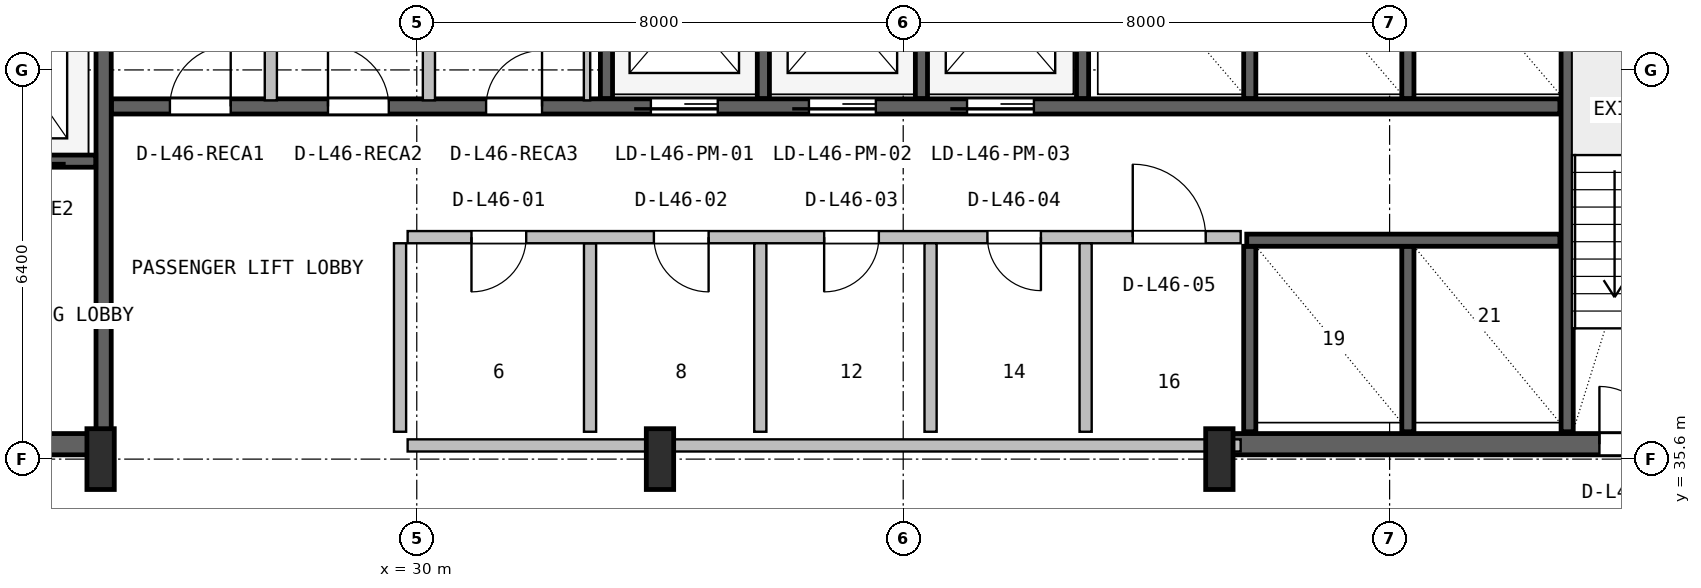
"""IFC4 building model, lengths in metres.
Left out: names, types, materials, properties, quantities, classifications, styles, units other than length and angle.
Written with IfcOpenShell. Run it as: python <this file> out.ifc"""

import sys

from ifc_helpers import new_model, si_unit, direction, frame, frame_2d, origin, origin_2d, place, context, subcontext, project, spatial, rectangle, i_section, extrude, source, transform, mapped, element, fill, save


model = new_model("IFC4")
c1 = context("Model", 3, precision=1e-05, world=origin(), true_north=direction((0.0, 1.0)))
c2 = subcontext(c1, "Body", "Model", "MODEL_VIEW")
j1 = project(units=[si_unit("LENGTHUNIT", "METRE"), si_unit("PLANEANGLEUNIT", "RADIAN")], contexts=[c1])
p1 = place(None, origin())
s1 = spatial("IfcSite", under=j1, at=p1, CompositionType="ELEMENT")
p2 = place(p1, origin())
s2 = spatial("IfcBuilding", under=s1, at=p2, CompositionType="ELEMENT")
p3 = place(p2, frame((0.0, 0.0, 187.6)))
s3 = spatial("IfcBuildingStorey", under=s2, at=p3, CompositionType="ELEMENT", Elevation=187.6)
p4 = place(p3, frame((15.67, 35.845, 0.0), z_axis=(0.0, 0.0, 1.0), x_axis=(1.0, 0.0, 0.0)))
e1 = element("IfcWall", 1, at=p4, inside=s3, PredefinedType="SHEAR", context=c2, shape_type="SweptSolid", body=[
    extrude(rectangle(XDim=9.13, YDim=0.35, at=frame_2d((4.565, 0.0))), origin(), (0.0, 0.0, 1.0), 3.52),
])
p5 = place(p4, frame((5.4, 0.0, 0.0)))
e2 = element("IfcOpeningElement", 2, at=p5, cuts=e1, PredefinedType="OPENING", context=c2, shape_type="SweptSolid", body=[
    extrude(rectangle(XDim=1.0, YDim=2.1, at=frame_2d((0.5, 1.05))), frame((0.0, 0.185, 0.0), z_axis=(0.0, -1.0, 0.0), x_axis=(1.0, 0.0, 0.0)), (0.0, 0.0, 1.0), 0.37),
])
p6 = place(p3, frame((43.2, 35.845, 0.0), z_axis=(0.0, 0.0, 1.0), x_axis=(1.0, 0.0, 0.0)))
e3 = element("IfcWall", 3, at=p6, inside=s3, PredefinedType="SHEAR", context=c2, shape_type="SweptSolid", body=[
    extrude(rectangle(XDim=9.13, YDim=0.35, at=frame_2d((4.565, 0.0))), origin(), (0.0, 0.0, 1.0), 3.52),
])
p7 = place(p6, frame((6.25, 0.0, 0.0)))
e4 = element("IfcOpeningElement", 4, at=p7, cuts=e3, PredefinedType="OPENING", context=c2, shape_type="SweptSolid", body=[
    extrude(rectangle(XDim=0.95, YDim=2.1, at=frame_2d((0.475, 1.05))), frame((0.0, 0.185, 0.0), z_axis=(0.0, -1.0, 0.0), x_axis=(1.0, 0.0, 0.0)), (0.0, 0.0, 1.0), 0.37),
])
m1 = source(origin(), c2, "Body", "SweptSolid", [
    extrude(i_section(OverallWidth=0.45, OverallDepth=1.0, WebThickness=0.016, FlangeThickness=0.03, FilletRadius=0.016, at=origin_2d()), origin(), (0.0, 0.0, 1.0), 3.8),
])
for number, where, z_axis, x_axis in (
    (5, (24.8, 35.6, 0.0), (0.0, 0.0, 1.0), (1.0, 0.0, 0.0)),
    (6, (34.0, 35.6, 0.0), (0.0, 0.0, 1.0), (1.0, 0.0, 0.0)),
    (7, (43.2, 35.6, 0.0), (0.0, 0.0, 1.0), (1.0, 0.0, 0.0)),
):
    element("IfcColumn", number, at=place(p3, frame(where, z_axis=z_axis, x_axis=x_axis)), inside=s3, PredefinedType="COLUMN", context=c2, shape_type="MappedRepresentation", body=[
        mapped(m1, transform((0.0, 0.0, 0.0), x_axis=(1.0, 0.0, 0.0), y_axis=(0.0, 1.0, 0.0), z_axis=(0.0, 0.0, 1.0), scale=1.0)),
    ])
p8 = place(p3, frame((24.85, 36.05, 0.0), z_axis=(0.0, 0.0, 1.0), x_axis=(0.0, 1.0, 0.0)))
e8 = element("IfcWall", 8, at=p8, inside=s3, PredefinedType="SHEAR", context=c2, shape_type="SweptSolid", body=[
    extrude(rectangle(XDim=10.45, YDim=0.25, at=frame_2d((5.225, 0.0))), origin(), (0.0, 0.0, 1.0), 3.52),
])
p9 = place(p3, frame((19.2, 40.5, 0.0), z_axis=(0.0, 0.0, 1.0), x_axis=(1.0, 0.0, 0.0)))
e9 = element("IfcWall", 9, at=p9, inside=s3, PredefinedType="SHEAR", context=c2, shape_type="SweptSolid", body=[
    extrude(rectangle(XDim=5.52, YDim=0.2, at=frame_2d((2.76, 0.0))), origin(), (0.0, 0.0, 1.0), 3.52),
])
p10 = place(p9, frame((1.05, 0.0, 0.0)))
e10 = element("IfcOpeningElement", 10, at=p10, cuts=e9, PredefinedType="OPENING", context=c2, shape_type="SweptSolid", body=[
    extrude(rectangle(XDim=1.1, YDim=2.18, at=frame_2d((0.55, 1.09))), frame((0.0, 0.11, 0.0), z_axis=(0.0, -1.0, 0.0), x_axis=(1.0, 0.0, 0.0)), (0.0, 0.0, 1.0), 0.22),
])
p11 = place(p9, frame((3.65, 0.0, 0.0)))
e11 = element("IfcOpeningElement", 11, at=p11, cuts=e9, PredefinedType="OPENING", context=c2, shape_type="SweptSolid", body=[
    extrude(rectangle(XDim=1.1, YDim=2.18, at=frame_2d((0.55, 1.09))), frame((0.0, 0.11, 0.0), z_axis=(0.0, -1.0, 0.0), x_axis=(1.0, 0.0, 0.0)), (0.0, 0.0, 1.0), 0.22),
])
p12 = place(p3, frame((48.92, 36.05, 0.0), z_axis=(0.0, 0.0, 1.0), x_axis=(0.0, 1.0, 0.0)))
e12 = element("IfcWall", 12, at=p12, inside=s3, PredefinedType="SHEAR", context=c2, shape_type="SweptSolid", body=[
    extrude(rectangle(XDim=10.5, YDim=0.2, at=frame_2d((5.25, 0.0))), origin(), (0.0, 0.0, 1.0), 3.52),
])
p13 = place(p3, frame((24.98, 41.4, 0.0), z_axis=(0.0, 0.0, 1.0), x_axis=(1.0, 0.0, 0.0)))
e13 = element("IfcWall", 13, at=p13, inside=s3, PredefinedType="SHEAR", context=c2, shape_type="SweptSolid", body=[
    extrude(rectangle(XDim=23.82, YDim=0.25, at=frame_2d((11.91, 0.0))), origin(), (0.0, 0.0, 1.0), 3.52),
])
p14 = place(p13, frame((8.87, 0.0, 0.0)))
e14 = element("IfcOpeningElement", 14, at=p14, cuts=e13, PredefinedType="OPENING", context=c2, shape_type="SweptSolid", body=[
    extrude(rectangle(XDim=1.1, YDim=2.18, at=frame_2d((0.55, 1.09))), frame((0.0, 0.135, 0.0), z_axis=(0.0, -1.0, 0.0), x_axis=(1.0, 0.0, 0.0)), (0.0, 0.0, 1.0), 0.27),
])
p15 = place(p13, frame((11.47, 0.0, 0.0)))
e15 = element("IfcOpeningElement", 15, at=p15, cuts=e13, PredefinedType="OPENING", context=c2, shape_type="SweptSolid", body=[
    extrude(rectangle(XDim=1.1, YDim=2.18, at=frame_2d((0.55, 1.09))), frame((0.0, 0.135, 0.0), z_axis=(0.0, -1.0, 0.0), x_axis=(1.0, 0.0, 0.0)), (0.0, 0.0, 1.0), 0.27),
])
p16 = place(p13, frame((14.07, 0.0, 0.0)))
e16 = element("IfcOpeningElement", 16, at=p16, cuts=e13, PredefinedType="OPENING", context=c2, shape_type="SweptSolid", body=[
    extrude(rectangle(XDim=1.1, YDim=2.18, at=frame_2d((0.55, 1.09))), frame((0.0, 0.135, 0.0), z_axis=(0.0, -1.0, 0.0), x_axis=(1.0, 0.0, 0.0)), (0.0, 0.0, 1.0), 0.27),
])
p17 = place(p13, frame((0.96, 0.0, 0.0)))
e17 = element("IfcOpeningElement", 17, at=p17, cuts=e13, PredefinedType="OPENING", context=c2, shape_type="SweptSolid", body=[
    extrude(rectangle(XDim=1.0, YDim=2.08, at=frame_2d((0.5, 1.04))), frame((0.0, 0.135, 0.0), z_axis=(0.0, -1.0, 0.0), x_axis=(1.0, 0.0, 0.0)), (0.0, 0.0, 1.0), 0.27),
])
p18 = place(p13, frame((3.56, 0.0, 0.0)))
e18 = element("IfcOpeningElement", 18, at=p18, cuts=e13, PredefinedType="OPENING", context=c2, shape_type="SweptSolid", body=[
    extrude(rectangle(XDim=1.0, YDim=2.08, at=frame_2d((0.5, 1.04))), frame((0.0, 0.135, 0.0), z_axis=(0.0, -1.0, 0.0), x_axis=(1.0, 0.0, 0.0)), (0.0, 0.0, 1.0), 0.27),
])
p19 = place(p13, frame((6.16, 0.0, 0.0)))
e19 = element("IfcOpeningElement", 19, at=p19, cuts=e13, PredefinedType="OPENING", context=c2, shape_type="SweptSolid", body=[
    extrude(rectangle(XDim=0.92, YDim=2.08, at=frame_2d((0.46, 1.04))), frame((0.0, 0.135, 0.0), z_axis=(0.0, -1.0, 0.0), x_axis=(1.0, 0.0, 0.0)), (0.0, 0.0, 1.0), 0.27),
])
p20 = place(p3, frame((33.12, 41.53, 0.0), z_axis=(0.0, 0.0, 1.0), x_axis=(0.0, 1.0, 0.0)))
e20 = element("IfcWall", 20, at=p20, inside=s3, PredefinedType="SHEAR", context=c2, shape_type="SweptSolid", body=[
    extrude(rectangle(XDim=5.02, YDim=0.2, at=frame_2d((2.51, 0.0))), origin(), (0.0, 0.0, 1.0), 3.52),
])
for number, where, z_axis, x_axis in (
    (21, (35.7, 41.53, 0.0), (0.0, 0.0, 1.0), (0.0, 1.0, 0.0)),
    (22, (38.3, 41.53, 0.0), (0.0, 0.0, 1.0), (0.0, 1.0, 0.0)),
):
    element("IfcWall", number, at=place(p3, frame(where, z_axis=z_axis, x_axis=x_axis)), inside=s3, PredefinedType="SHEAR", context=c2, shape_type="SweptSolid", body=[
        extrude(rectangle(XDim=2.87, YDim=0.2, at=frame_2d((1.435, 0.0))), origin(), (0.0, 0.0, 1.0), 3.52),
    ])
p21 = place(p3, frame((40.95, 41.53, 0.0), z_axis=(0.0, 0.0, 1.0), x_axis=(0.0, 1.0, 0.0)))
e23 = element("IfcWall", 23, at=p21, inside=s3, PredefinedType="SHEAR", context=c2, shape_type="SweptSolid", body=[
    extrude(rectangle(XDim=5.02, YDim=0.2, at=frame_2d((2.51, 0.0))), origin(), (0.0, 0.0, 1.0), 3.52),
])
for number, where, z_axis, x_axis in (
    (24, (43.7, 41.53, 0.0), (0.0, 0.0, 1.0), (0.0, 1.0, 0.0)),
    (25, (46.3, 41.53, 0.0), (0.0, 0.0, 1.0), (0.0, 1.0, 0.0)),
):
    element("IfcWall", number, at=place(p3, frame(where, z_axis=z_axis, x_axis=x_axis)), inside=s3, PredefinedType="SHEAR", context=c2, shape_type="SweptSolid", body=[
        extrude(rectangle(XDim=2.87, YDim=0.2, at=frame_2d((1.435, 0.0))), origin(), (0.0, 0.0, 1.0), 3.52),
    ])
for number, where, z_axis, x_axis in (
    (26, (43.7, 36.05, 0.0), (0.0, 0.0, 1.0), (0.0, 1.0, 0.0)),
    (27, (46.3, 36.05, 0.0), (0.0, 0.0, 1.0), (0.0, 1.0, 0.0)),
):
    element("IfcWall", number, at=place(p3, frame(where, z_axis=z_axis, x_axis=x_axis)), inside=s3, PredefinedType="SHEAR", context=c2, shape_type="SweptSolid", body=[
        extrude(rectangle(XDim=3.05, YDim=0.2, at=frame_2d((1.525, 0.0))), origin(), (0.0, 0.0, 1.0), 3.52),
    ])
p22 = place(p3, frame((43.65, 39.2, 0.0), z_axis=(0.0, 0.0, 1.0), x_axis=(1.0, 0.0, 0.0)))
e28 = element("IfcWall", 28, at=p22, inside=s3, PredefinedType="SHEAR", context=c2, shape_type="SweptSolid", body=[
    extrude(rectangle(XDim=5.15, YDim=0.2, at=frame_2d((2.575, 0.0))), origin(), (0.0, 0.0, 1.0), 3.52),
])
p23 = place(p3, frame((29.85, 35.825, 0.0), z_axis=(0.0, 0.0, 1.0), x_axis=(1.0, 0.0, 0.0)))
e29 = element("IfcWall", 29, at=p23, inside=s3, PredefinedType="SOLIDWALL", context=c2, shape_type="SweptSolid", body=[
    extrude(rectangle(XDim=13.7, YDim=0.2, at=frame_2d((6.85, 0.0))), origin(), (0.0, 0.0, 1.0), 2.545),
])
p24 = place(p3, frame((32.85, 36.05, 0.0), z_axis=(0.0, 0.0, 1.0), x_axis=(0.0, 1.0, 0.0)))
e30 = element("IfcWall", 30, at=p24, inside=s3, PredefinedType="PLUMBINGWALL", context=c2, shape_type="SweptSolid", body=[
    extrude(rectangle(XDim=3.1, YDim=0.2, at=frame_2d((1.55, 0.0))), origin(), (0.0, 0.0, 1.0), 3.5),
])
p25 = place(p3, frame((29.85, 39.25, 0.0), z_axis=(0.0, 0.0, 1.0), x_axis=(1.0, 0.0, 0.0)))
e31 = element("IfcWall", 31, at=p25, inside=s3, PredefinedType="SOLIDWALL", context=c2, shape_type="SweptSolid", body=[
    extrude(rectangle(XDim=13.7, YDim=0.2, at=frame_2d((6.85, 0.0))), origin(), (0.0, 0.0, 1.0), 3.5),
])
p26 = place(p25, frame((1.05, 0.0, 0.0)))
e32 = element("IfcOpeningElement", 32, at=p26, cuts=e31, PredefinedType="OPENING", context=c2, shape_type="SweptSolid", body=[
    extrude(rectangle(XDim=0.9, YDim=2.06, at=frame_2d((0.45, 1.03))), frame((0.0, 0.11, 0.0), z_axis=(0.0, -1.0, 0.0), x_axis=(1.0, 0.0, 0.0)), (0.0, 0.0, 1.0), 0.22),
])
p27 = place(p25, frame((4.05, 0.0, 0.0)))
e33 = element("IfcOpeningElement", 33, at=p27, cuts=e31, PredefinedType="OPENING", context=c2, shape_type="SweptSolid", body=[
    extrude(rectangle(XDim=0.9, YDim=2.06, at=frame_2d((0.45, 1.03))), frame((0.0, 0.11, 0.0), z_axis=(0.0, -1.0, 0.0), x_axis=(1.0, 0.0, 0.0)), (0.0, 0.0, 1.0), 0.22),
])
p28 = place(p25, frame((6.85, 0.0, 0.0)))
e34 = element("IfcOpeningElement", 34, at=p28, cuts=e31, PredefinedType="OPENING", context=c2, shape_type="SweptSolid", body=[
    extrude(rectangle(XDim=0.9, YDim=2.06, at=frame_2d((0.45, 1.03))), frame((0.0, 0.11, 0.0), z_axis=(0.0, -1.0, 0.0), x_axis=(1.0, 0.0, 0.0)), (0.0, 0.0, 1.0), 0.22),
])
p29 = place(p25, frame((9.535, 0.0, 0.0)))
e35 = element("IfcOpeningElement", 35, at=p29, cuts=e31, PredefinedType="OPENING", context=c2, shape_type="SweptSolid", body=[
    extrude(rectangle(XDim=0.88, YDim=2.06, at=frame_2d((0.44, 1.03))), frame((0.0, 0.11, 0.0), z_axis=(0.0, -1.0, 0.0), x_axis=(1.0, 0.0, 0.0)), (0.0, 0.0, 1.0), 0.22),
])
p30 = place(p25, frame((11.925, 0.0, 0.0)))
e36 = element("IfcOpeningElement", 36, at=p30, cuts=e31, PredefinedType="OPENING", context=c2, shape_type="SweptSolid", body=[
    extrude(rectangle(XDim=1.2, YDim=2.1, at=frame_2d((0.6, 1.05))), frame((0.0, 0.11, 0.0), z_axis=(0.0, -1.0, 0.0), x_axis=(1.0, 0.0, 0.0)), (0.0, 0.0, 1.0), 0.22),
])
for number, where, z_axis, x_axis in (
    (37, (29.725, 36.05, 0.0), (0.0, 0.0, 1.0), (0.0, 1.0, 0.0)),
    (38, (35.65, 36.05, 0.0), (0.0, 0.0, 1.0), (0.0, 1.0, 0.0)),
    (39, (38.45, 36.05, 0.0), (0.0, 0.0, 1.0), (0.0, 1.0, 0.0)),
):
    element("IfcWall", number, at=place(p3, frame(where, z_axis=z_axis, x_axis=x_axis)), inside=s3, PredefinedType="PLUMBINGWALL", context=c2, shape_type="SweptSolid", body=[
        extrude(rectangle(XDim=3.1, YDim=0.2, at=frame_2d((1.55, 0.0))), origin(), (0.0, 0.0, 1.0), 3.5),
    ])
p31 = place(p3, frame((41.0, 36.05, 0.0), z_axis=(0.0, 0.0, 1.0), x_axis=(0.0, 1.0, 0.0)))
e40 = element("IfcWall", 40, at=p31, inside=s3, PredefinedType="SOLIDWALL", context=c2, shape_type="SweptSolid", body=[
    extrude(rectangle(XDim=3.1, YDim=0.2, at=frame_2d((1.55, 0.0))), origin(), (0.0, 0.0, 1.0), 3.5),
])
for number, where, z_axis, x_axis in (
    (41, (27.6, 41.5, 0.0), (0.0, 0.0, 1.0), (0.0, 1.0, 0.0)),
    (42, (30.2, 41.5, 0.0), (0.0, 0.0, 1.0), (0.0, 1.0, 0.0)),
):
    element("IfcWall", number, at=place(p3, frame(where, z_axis=z_axis, x_axis=x_axis)), inside=s3, PredefinedType="SOLIDWALL", context=c2, shape_type="SweptSolid", body=[
        extrude(rectangle(XDim=5.02, YDim=0.2, at=frame_2d((2.51, 0.0))), origin(), (0.0, 0.0, 1.0), 3.5),
    ])
p32 = place(p3, frame((32.8, 41.5, 0.0), z_axis=(0.0, 0.0, 1.0), x_axis=(0.0, 1.0, 0.0)))
e43 = element("IfcWall", 43, at=p32, inside=s3, PredefinedType="PARTITIONING", context=c2, shape_type="SweptSolid", body=[
    extrude(rectangle(XDim=5.02, YDim=0.105, at=frame_2d((2.51, 0.0))), origin(), (0.0, 0.0, 1.0), 3.5),
])
m2 = source(origin(), c2, "Body", "SweptSolid", [
    extrude(rectangle(XDim=0.95, YDim=2.1, at=frame_2d((0.475, 1.05))), frame((0.0, 0.025, 0.0), z_axis=(0.0, -1.0, 0.0), x_axis=(1.0, 0.0, 0.0)), (0.0, 0.0, 1.0), 0.05),
])
p33 = place(p7, origin())
e44 = element("IfcDoor", 44, at=p33, inside=s3, OperationType="SINGLE_SWING_LEFT", PredefinedType="DOOR", context=c2, shape_type="MappedRepresentation", body=[
    mapped(m2, transform((0.0, 0.0, 0.0), x_axis=(1.0, 0.0, 0.0), y_axis=(0.0, 1.0, 0.0), z_axis=(0.0, 0.0, 1.0), scale=1.0)),
])
fill(e4, e44)
m3 = source(origin(), c2, "Body", "SweptSolid", [
    extrude(rectangle(XDim=1.1, YDim=2.18, at=frame_2d((0.55, 1.09))), frame((0.0, 0.025, 0.0), z_axis=(0.0, -1.0, 0.0), x_axis=(1.0, 0.0, 0.0)), (0.0, 0.0, 1.0), 0.05),
])
p34 = place(p14, frame((1.1, 0.0, 0.0), z_axis=(0.0, 0.0, 1.0), x_axis=(-1.0, 0.0, 0.0)))
e45 = element("IfcDoor", 45, at=p34, inside=s3, OperationType="SLIDING_TO_LEFT", PredefinedType="DOOR", context=c2, shape_type="MappedRepresentation", body=[
    mapped(m3, transform((0.0, 0.0, 0.0), x_axis=(1.0, 0.0, 0.0), y_axis=(0.0, 1.0, 0.0), z_axis=(0.0, 0.0, 1.0), scale=1.0)),
])
fill(e14, e45)
p35 = place(p15, frame((1.1, 0.0, 0.0), z_axis=(0.0, 0.0, 1.0), x_axis=(-1.0, 0.0, 0.0)))
e46 = element("IfcDoor", 46, at=p35, inside=s3, OperationType="SLIDING_TO_LEFT", PredefinedType="DOOR", context=c2, shape_type="MappedRepresentation", body=[
    mapped(m3, transform((0.0, 0.0, 0.0), x_axis=(1.0, 0.0, 0.0), y_axis=(0.0, 1.0, 0.0), z_axis=(0.0, 0.0, 1.0), scale=1.0)),
])
fill(e15, e46)
p36 = place(p16, frame((1.1, 0.0, 0.0), z_axis=(0.0, 0.0, 1.0), x_axis=(-1.0, 0.0, 0.0)))
e47 = element("IfcDoor", 47, at=p36, inside=s3, OperationType="SLIDING_TO_LEFT", PredefinedType="DOOR", context=c2, shape_type="MappedRepresentation", body=[
    mapped(m3, transform((0.0, 0.0, 0.0), x_axis=(1.0, 0.0, 0.0), y_axis=(0.0, 1.0, 0.0), z_axis=(0.0, 0.0, 1.0), scale=1.0)),
])
fill(e16, e47)
m4 = source(origin(), c2, "Body", "SweptSolid", [
    extrude(rectangle(XDim=1.0, YDim=2.08, at=frame_2d((0.5, 1.04))), frame((0.0, 0.025, 0.0), z_axis=(0.0, -1.0, 0.0), x_axis=(1.0, 0.0, 0.0)), (0.0, 0.0, 1.0), 0.05),
])
p37 = place(p17, origin())
e48 = element("IfcDoor", 48, at=p37, inside=s3, OperationType="SINGLE_SWING_RIGHT", PredefinedType="DOOR", context=c2, shape_type="MappedRepresentation", body=[
    mapped(m4, transform((0.0, 0.0, 0.0), x_axis=(1.0, 0.0, 0.0), y_axis=(0.0, 1.0, 0.0), z_axis=(0.0, 0.0, 1.0), scale=1.0)),
])
fill(e17, e48)
p38 = place(p18, origin())
e49 = element("IfcDoor", 49, at=p38, inside=s3, OperationType="SINGLE_SWING_LEFT", PredefinedType="DOOR", context=c2, shape_type="MappedRepresentation", body=[
    mapped(m4, transform((0.0, 0.0, 0.0), x_axis=(1.0, 0.0, 0.0), y_axis=(0.0, 1.0, 0.0), z_axis=(0.0, 0.0, 1.0), scale=1.0)),
])
fill(e18, e49)
m5 = source(origin(), c2, "Body", "SweptSolid", [
    extrude(rectangle(XDim=0.92, YDim=2.08, at=frame_2d((0.46, 1.04))), frame((0.0, 0.025, 0.0), z_axis=(0.0, -1.0, 0.0), x_axis=(1.0, 0.0, 0.0)), (0.0, 0.0, 1.0), 0.05),
])
p39 = place(p19, origin())
e50 = element("IfcDoor", 50, at=p39, inside=s3, OperationType="SINGLE_SWING_RIGHT", PredefinedType="DOOR", context=c2, shape_type="MappedRepresentation", body=[
    mapped(m5, transform((0.0, 0.0, 0.0), x_axis=(1.0, 0.0, 0.0), y_axis=(0.0, 1.0, 0.0), z_axis=(0.0, 0.0, 1.0), scale=1.0)),
])
fill(e19, e50)
m6 = source(origin(), c2, "Body", "SweptSolid", [
    extrude(rectangle(XDim=0.9, YDim=2.06, at=frame_2d((0.45, 1.03))), frame((0.0, 0.025, 0.0), z_axis=(0.0, -1.0, 0.0), x_axis=(1.0, 0.0, 0.0)), (0.0, 0.0, 1.0), 0.05),
])
p40 = place(p26, frame((0.9, 0.0, 0.0), z_axis=(0.0, 0.0, 1.0), x_axis=(-1.0, 0.0, 0.0)))
e51 = element("IfcDoor", 51, at=p40, inside=s3, OperationType="SINGLE_SWING_LEFT", PredefinedType="DOOR", context=c2, shape_type="MappedRepresentation", body=[
    mapped(m6, transform((0.0, 0.0, 0.0), x_axis=(1.0, 0.0, 0.0), y_axis=(0.0, 1.0, 0.0), z_axis=(0.0, 0.0, 1.0), scale=1.0)),
])
fill(e32, e51)
p41 = place(p27, frame((0.9, 0.0, 0.0), z_axis=(0.0, 0.0, 1.0), x_axis=(-1.0, 0.0, 0.0)))
e52 = element("IfcDoor", 52, at=p41, inside=s3, OperationType="SINGLE_SWING_RIGHT", PredefinedType="DOOR", context=c2, shape_type="MappedRepresentation", body=[
    mapped(m6, transform((0.0, 0.0, 0.0), x_axis=(1.0, 0.0, 0.0), y_axis=(0.0, 1.0, 0.0), z_axis=(0.0, 0.0, 1.0), scale=1.0)),
])
fill(e33, e52)
p42 = place(p28, frame((0.9, 0.0, 0.0), z_axis=(0.0, 0.0, 1.0), x_axis=(-1.0, 0.0, 0.0)))
e53 = element("IfcDoor", 53, at=p42, inside=s3, OperationType="SINGLE_SWING_LEFT", PredefinedType="DOOR", context=c2, shape_type="MappedRepresentation", body=[
    mapped(m6, transform((0.0, 0.0, 0.0), x_axis=(1.0, 0.0, 0.0), y_axis=(0.0, 1.0, 0.0), z_axis=(0.0, 0.0, 1.0), scale=1.0)),
])
fill(e34, e53)
m7 = source(origin(), c2, "Body", "SweptSolid", [
    extrude(rectangle(XDim=0.88, YDim=2.06, at=frame_2d((0.44, 1.03))), frame((0.0, 0.025, 0.0), z_axis=(0.0, -1.0, 0.0), x_axis=(1.0, 0.0, 0.0)), (0.0, 0.0, 1.0), 0.05),
])
p43 = place(p29, frame((0.88, 0.0, 0.0), z_axis=(0.0, 0.0, 1.0), x_axis=(-1.0, 0.0, 0.0)))
e54 = element("IfcDoor", 54, at=p43, inside=s3, OperationType="SINGLE_SWING_RIGHT", PredefinedType="DOOR", context=c2, shape_type="MappedRepresentation", body=[
    mapped(m7, transform((0.0, 0.0, 0.0), x_axis=(1.0, 0.0, 0.0), y_axis=(0.0, 1.0, 0.0), z_axis=(0.0, 0.0, 1.0), scale=1.0)),
])
fill(e35, e54)
m8 = source(origin(), c2, "Body", "SweptSolid", [
    extrude(rectangle(XDim=1.2, YDim=2.1, at=frame_2d((0.6, 1.05))), frame((0.0, 0.025, 0.0), z_axis=(0.0, -1.0, 0.0), x_axis=(1.0, 0.0, 0.0)), (0.0, 0.0, 1.0), 0.05),
])
p44 = place(p30, origin())
e55 = element("IfcDoor", 55, at=p44, inside=s3, OperationType="SINGLE_SWING_LEFT", PredefinedType="DOOR", context=c2, shape_type="MappedRepresentation", body=[
    mapped(m8, transform((0.0, 0.0, 0.0), x_axis=(1.0, 0.0, 0.0), y_axis=(0.0, 1.0, 0.0), z_axis=(0.0, 0.0, 1.0), scale=1.0)),
])
fill(e36, e55)
save(model, sys.argv[1])
